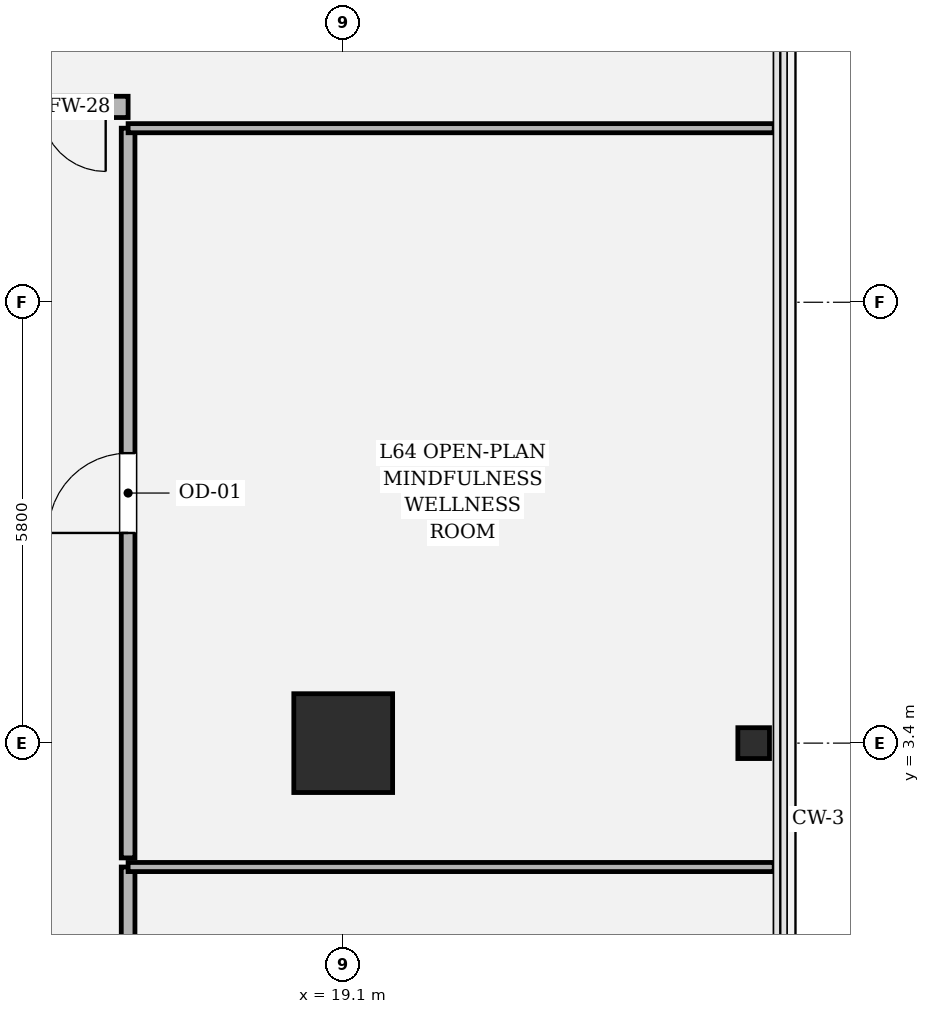
"""IFC4 building model, lengths in metres.
Left out: names, types, materials, properties, quantities, classifications, styles, units other than length and angle.
Written with IfcOpenShell. Run it as: python <this file> out.ifc"""

import sys

from ifc_helpers import new_model, si_unit, direction, frame, frame_2d, origin, origin_2d, place, context, subcontext, project, spatial, rectangle, hollow_rectangle, i_section, extrude, element, fill, save


model = new_model("IFC4")
c1 = context("Model", 3, precision=1e-05, world=origin(), true_north=direction((0.0, 1.0)))
c2 = subcontext(c1, "Body", "Model", "MODEL_VIEW")
j1 = project(units=[si_unit("LENGTHUNIT", "METRE"), si_unit("PLANEANGLEUNIT", "RADIAN")], contexts=[c1])
p1 = place(None, origin())
s1 = spatial("IfcSite", under=j1, at=p1, CompositionType="ELEMENT")
p2 = place(p1, origin())
s2 = spatial("IfcBuilding", under=s1, at=p2, CompositionType="ELEMENT")
p3 = place(p2, frame((0.0, 0.0, 271.65)))
s3 = spatial("IfcBuildingStorey", under=s2, at=p3, CompositionType="ELEMENT", Elevation=271.65)
p4 = place(p3, frame((19.1, 3.4, 0.0), z_axis=(0.0, 0.0, 1.0), x_axis=(1.0, 0.0, 0.0)))
e1 = element("IfcColumn", 1, at=p4, inside=s3, PredefinedType="COLUMN", context=c2, shape_type="SweptSolid", body=[
    extrude(hollow_rectangle(XDim=1.3, YDim=1.3, WallThickness=0.038, at=origin_2d()), origin(), (0.0, 0.0, 1.0), 4.05),
])
p5 = place(p3, frame((24.5, 3.4, 0.0), z_axis=(0.0, 0.0, 1.0), x_axis=(0.0, 1.0, 0.0)))
e2 = element("IfcColumn", 2, at=p5, inside=s3, PredefinedType="COLUMN", context=c2, shape_type="SweptSolid", body=[
    extrude(i_section(OverallWidth=0.406, OverallDepth=0.416, WebThickness=0.029, FlangeThickness=0.048, FilletRadius=0.018, at=origin_2d()), origin(), (0.0, 0.0, 1.0), 4.048),
])
p6 = place(p3, frame((16.27, -13.82, 0.0), z_axis=(0.0, 0.0, 1.0), x_axis=(0.0, 1.0, 0.0)))
e3 = element("IfcWall", 3, at=p6, inside=s3, PredefinedType="PARTITIONING", context=c2, shape_type="SweptSolid", body=[
    extrude(rectangle(XDim=15.59, YDim=0.18, at=frame_2d((7.795, 0.0))), origin(), (0.0, 0.0, 1.0), 3.244),
])
p7 = place(p6, frame((7.095, 0.0, 0.0)))
e4 = element("IfcOpeningElement", 4, at=p7, cuts=e3, PredefinedType="OPENING", context=c2, shape_type="SweptSolid", body=[
    extrude(rectangle(XDim=1.4, YDim=2.25, at=frame_2d((0.7, 1.125))), frame((0.0, 0.1, 0.0), z_axis=(0.0, -1.0, 0.0), x_axis=(1.0, 0.0, 0.0)), (0.0, 0.0, 1.0), 0.2),
])
p8 = place(p3, frame((16.27, 1.77, 0.0), z_axis=(0.0, 0.0, 1.0), x_axis=(1.0, 0.0, 0.0)))
e5 = element("IfcWall", 5, at=p8, inside=s3, PredefinedType="PARTITIONING", context=c2, shape_type="SweptSolid", body=[
    extrude(rectangle(XDim=8.5, YDim=0.12, at=frame_2d((4.25, 0.0))), origin(), (0.0, 0.0, 1.0), 2.564),
])
p9 = place(p3, frame((16.27, 1.89, 0.0), z_axis=(0.0, 0.0, 1.0), x_axis=(0.0, 1.0, 0.0)))
e6 = element("IfcWall", 6, at=p9, inside=s3, PredefinedType="PARTITIONING", context=c2, shape_type="SweptSolid", body=[
    extrude(rectangle(XDim=9.6, YDim=0.18, at=frame_2d((4.8, 0.0))), origin(), (0.0, 0.0, 1.0), 3.244),
])
p10 = place(p9, frame((4.275, 0.0, 0.0)))
e7 = element("IfcOpeningElement", 7, at=p10, cuts=e6, PredefinedType="OPENING", context=c2, shape_type="SweptSolid", body=[
    extrude(rectangle(XDim=1.05, YDim=2.2, at=frame_2d((0.525, 1.1))), frame((0.0, 0.1, 0.0), z_axis=(0.0, -1.0, 0.0), x_axis=(1.0, 0.0, 0.0)), (0.0, 0.0, 1.0), 0.2),
])
p11 = place(p3, frame((16.27, 11.49, 0.0), z_axis=(0.0, 0.0, 1.0), x_axis=(1.0, 0.0, 0.0)))
e8 = element("IfcWall", 8, at=p11, inside=s3, PredefinedType="PARTITIONING", context=c2, shape_type="SweptSolid", body=[
    extrude(rectangle(XDim=8.5, YDim=0.12, at=frame_2d((4.25, 0.0))), origin(), (0.0, 0.0, 1.0), 2.564),
])
p12 = place(p3, frame((16.27, 11.77, 0.0), z_axis=(0.0, 0.0, 1.0), x_axis=(-1.0, 0.0, 0.0)))
e9 = element("IfcWall", 9, at=p12, inside=s3, PredefinedType="SOLIDWALL", context=c2, shape_type="SweptSolid", body=[
    extrude(rectangle(XDim=2.29, YDim=0.28, at=frame_2d((1.145, 0.0))), origin(), (0.0, 0.0, 1.0), 3.484),
])
p13 = place(p12, frame((0.295, 0.0, 0.0)))
e10 = element("IfcOpeningElement", 10, at=p13, cuts=e9, PredefinedType="OPENING", context=c2, shape_type="SweptSolid", body=[
    extrude(rectangle(XDim=1.7, YDim=2.3, at=frame_2d((0.85, 1.15))), frame((0.0, 0.15, 0.0), z_axis=(0.0, -1.0, 0.0), x_axis=(1.0, 0.0, 0.0)), (0.0, 0.0, 1.0), 0.3),
])
p14 = place(p10, origin())
e11 = element("IfcDoor", 11, at=p14, inside=s3, OperationType="SINGLE_SWING_LEFT", PredefinedType="DOOR", context=c2, shape_type="SweptSolid", body=[
    extrude(rectangle(XDim=1.05, YDim=2.2, at=frame_2d((0.525, 1.1))), frame((0.0, 0.025, 0.0), z_axis=(0.0, -1.0, 0.0), x_axis=(1.0, 0.0, 0.0)), (0.0, 0.0, 1.0), 0.05),
])
fill(e7, e11)
p15 = place(p13, origin())
e12 = element("IfcDoor", 12, at=p15, inside=s3, OperationType="DOUBLE_DOOR_SINGLE_SWING", PredefinedType="DOOR", context=c2, shape_type="SweptSolid", body=[
    extrude(rectangle(XDim=1.7, YDim=2.3, at=frame_2d((0.85, 1.15))), frame((0.0, 0.025, 0.0), z_axis=(0.0, -1.0, 0.0), x_axis=(1.0, 0.0, 0.0)), (0.0, 0.0, 1.0), 0.05),
])
fill(e10, e12)
save(model, sys.argv[1])
